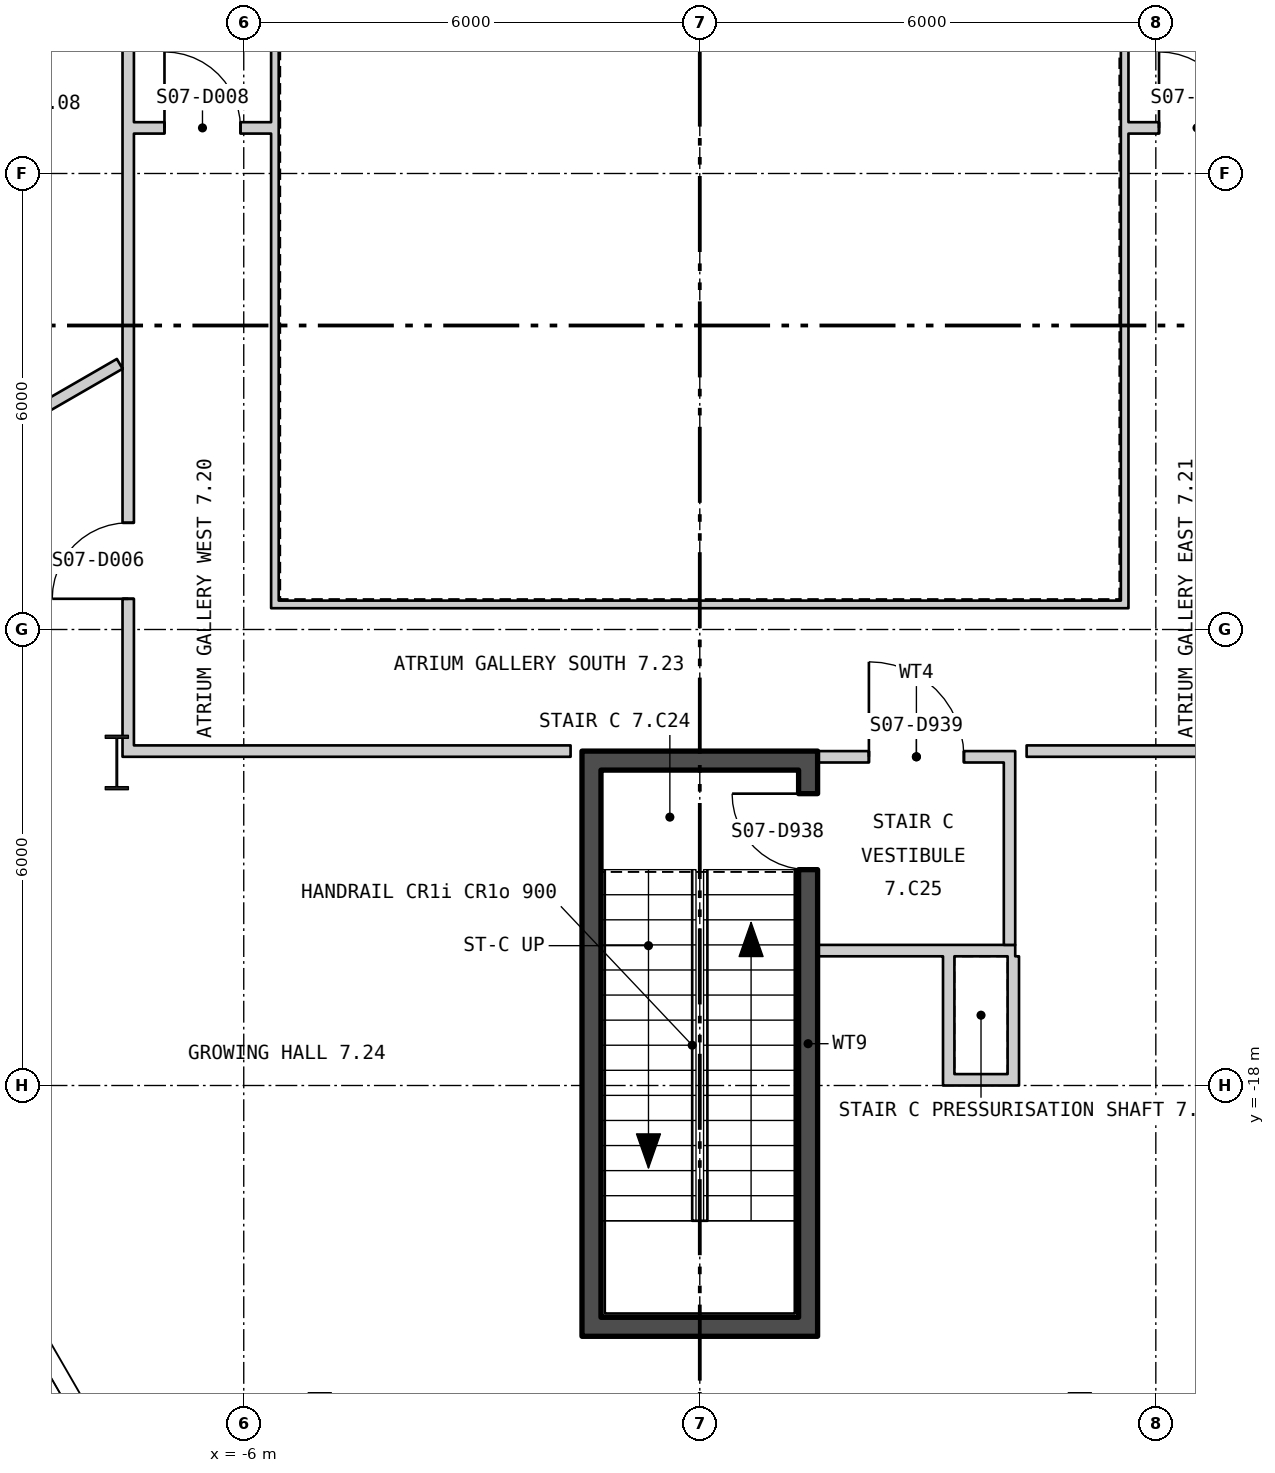
"""IFC4 building model, lengths in metres.
Left out: names, types, materials, properties, quantities, classifications, styles, units other than length and angle.
Written with IfcOpenShell. Run it as: python <this file> out.ifc"""

import sys

from ifc_helpers import new_model, si_unit, direction, frame, frame_2d, origin, origin_2d, place, context, subcontext, project, spatial, polyline, rectangle, i_section, outline, extrude, element, fill, save


model = new_model("IFC4")
c1 = context("Model", 3, precision=1e-05, world=origin(), true_north=direction((0.0, 1.0)))
c2 = subcontext(c1, "Body", "Model", "MODEL_VIEW")
j1 = project(units=[si_unit("LENGTHUNIT", "METRE"), si_unit("PLANEANGLEUNIT", "RADIAN")], contexts=[c1])
p1 = place(None, origin())
s1 = spatial("IfcSite", under=j1, at=p1, CompositionType="ELEMENT")
p2 = place(p1, origin())
s2 = spatial("IfcBuilding", under=s1, at=p2, CompositionType="ELEMENT")
p3 = place(p2, frame((0.0, 0.0, 97.8)))
s3 = spatial("IfcBuildingStorey", under=s2, at=p3, CompositionType="ELEMENT", Elevation=97.8)
for number, where, z_axis, x_axis in (
    (1, (-7.67, -13.75, 0.0), (0.0, 0.0, 1.0), (1.0, 0.0, 0.0)),
    (2, (5.0, -22.4, 0.0), (0.0, 0.0, 1.0), (1.0, 0.0, 0.0)),
    (3, (-5.0, -22.4, 0.0), (0.0, 0.0, 1.0), (1.0, 0.0, 0.0)),
):
    element("IfcColumn", number, at=place(p3, frame(where, z_axis=z_axis, x_axis=x_axis)), inside=s3, PredefinedType="COLUMN", context=c2, shape_type="SweptSolid", body=[
        extrude(i_section(OverallWidth=0.304, OverallDepth=0.716, WebThickness=0.021, FlangeThickness=0.04, at=origin_2d()), origin(), (0.0, 0.0, 1.0), 4.5),
    ])
p4 = place(p3, frame((-27.775, 11.479, -0.18), z_axis=(0.0, 0.0, 1.0), x_axis=(0.500000711659, -0.866024992908, 0.0)))
e4 = element("IfcWall", 4, at=p4, inside=s3, PredefinedType="SOLIDWALL", context=c2, shape_type="SweptSolid", body=[
    extrude(outline(polyline([(-0.13, -0.225), (45.87, -0.225), (45.61, 0.225), (0.13, 0.225), (-0.13, -0.225)])), origin(), (0.0, 0.0, 1.0), 4.28),
])
p5 = place(p4, frame((1.424, 0.0, 1.08)))
e5 = element("IfcOpeningElement", 5, at=p5, cuts=e4, PredefinedType="OPENING", context=c2, shape_type="SweptSolid", body=[
    extrude(rectangle(XDim=2.4, YDim=2.6, at=frame_2d((1.2, 1.3))), frame((0.0, 0.235, 0.0), z_axis=(0.0, -1.0, 0.0), x_axis=(1.0, 0.0, 0.0)), (0.0, 0.0, 1.0), 0.47),
])
p6 = place(p4, frame((5.893, 0.0, 1.08)))
e6 = element("IfcOpeningElement", 6, at=p6, cuts=e4, PredefinedType="OPENING", context=c2, shape_type="SweptSolid", body=[
    extrude(rectangle(XDim=2.4, YDim=2.6, at=frame_2d((1.2, 1.3))), frame((0.0, 0.235, 0.0), z_axis=(0.0, -1.0, 0.0), x_axis=(1.0, 0.0, 0.0)), (0.0, 0.0, 1.0), 0.47),
])
p7 = place(p4, frame((10.401, 0.0, 1.08)))
e7 = element("IfcOpeningElement", 7, at=p7, cuts=e4, PredefinedType="OPENING", context=c2, shape_type="SweptSolid", body=[
    extrude(rectangle(XDim=2.4, YDim=2.6, at=frame_2d((1.2, 1.3))), frame((0.0, 0.235, 0.0), z_axis=(0.0, -1.0, 0.0), x_axis=(1.0, 0.0, 0.0)), (0.0, 0.0, 1.0), 0.47),
])
p8 = place(p4, frame((14.909, 0.0, 1.08)))
e8 = element("IfcOpeningElement", 8, at=p8, cuts=e4, PredefinedType="OPENING", context=c2, shape_type="SweptSolid", body=[
    extrude(rectangle(XDim=2.4, YDim=2.6, at=frame_2d((1.2, 1.3))), frame((0.0, 0.235, 0.0), z_axis=(0.0, -1.0, 0.0), x_axis=(1.0, 0.0, 0.0)), (0.0, 0.0, 1.0), 0.47),
])
p9 = place(p4, frame((19.416, 0.0, 1.08)))
e9 = element("IfcOpeningElement", 9, at=p9, cuts=e4, PredefinedType="OPENING", context=c2, shape_type="SweptSolid", body=[
    extrude(rectangle(XDim=2.4, YDim=2.6, at=frame_2d((1.2, 1.3))), frame((0.0, 0.235, 0.0), z_axis=(0.0, -1.0, 0.0), x_axis=(1.0, 0.0, 0.0)), (0.0, 0.0, 1.0), 0.47),
])
p10 = place(p4, frame((23.924, 0.0, 1.08)))
e10 = element("IfcOpeningElement", 10, at=p10, cuts=e4, PredefinedType="OPENING", context=c2, shape_type="SweptSolid", body=[
    extrude(rectangle(XDim=2.4, YDim=2.6, at=frame_2d((1.2, 1.3))), frame((0.0, 0.235, 0.0), z_axis=(0.0, -1.0, 0.0), x_axis=(1.0, 0.0, 0.0)), (0.0, 0.0, 1.0), 0.47),
])
p11 = place(p4, frame((28.431, 0.0, 1.08)))
e11 = element("IfcOpeningElement", 11, at=p11, cuts=e4, PredefinedType="OPENING", context=c2, shape_type="SweptSolid", body=[
    extrude(rectangle(XDim=2.4, YDim=2.6, at=frame_2d((1.2, 1.3))), frame((0.0, 0.235, 0.0), z_axis=(0.0, -1.0, 0.0), x_axis=(1.0, 0.0, 0.0)), (0.0, 0.0, 1.0), 0.47),
])
p12 = place(p4, frame((32.939, 0.0, 1.08)))
e12 = element("IfcOpeningElement", 12, at=p12, cuts=e4, PredefinedType="OPENING", context=c2, shape_type="SweptSolid", body=[
    extrude(rectangle(XDim=2.4, YDim=2.6, at=frame_2d((1.2, 1.3))), frame((0.0, 0.235, 0.0), z_axis=(0.0, -1.0, 0.0), x_axis=(1.0, 0.0, 0.0)), (0.0, 0.0, 1.0), 0.47),
])
p13 = place(p4, frame((37.447, 0.0, 1.08)))
e13 = element("IfcOpeningElement", 13, at=p13, cuts=e4, PredefinedType="OPENING", context=c2, shape_type="SweptSolid", body=[
    extrude(rectangle(XDim=2.4, YDim=2.6, at=frame_2d((1.2, 1.3))), frame((0.0, 0.235, 0.0), z_axis=(0.0, -1.0, 0.0), x_axis=(1.0, 0.0, 0.0)), (0.0, 0.0, 1.0), 0.47),
])
p14 = place(p4, frame((41.916, 0.0, 1.08)))
e14 = element("IfcOpeningElement", 14, at=p14, cuts=e4, PredefinedType="OPENING", context=c2, shape_type="SweptSolid", body=[
    extrude(rectangle(XDim=2.4, YDim=2.6, at=frame_2d((1.2, 1.3))), frame((0.0, 0.235, 0.0), z_axis=(0.0, -1.0, 0.0), x_axis=(1.0, 0.0, 0.0)), (0.0, 0.0, 1.0), 0.47),
])
p15 = place(p3, frame((4.905, -28.133, -0.18), z_axis=(0.0, 0.0, 1.0), x_axis=(0.500000711659, 0.866024992908, 0.0)))
e15 = element("IfcWall", 15, at=p15, inside=s3, PredefinedType="SOLIDWALL", context=c2, shape_type="SweptSolid", body=[
    extrude(outline(polyline([(-0.13, -0.225), (45.87, -0.225), (45.61, 0.225), (0.13, 0.225), (-0.13, -0.225)])), origin(), (0.0, 0.0, 1.0), 4.28),
])
p16 = place(p15, frame((1.424, 0.0, 1.08)))
e16 = element("IfcOpeningElement", 16, at=p16, cuts=e15, PredefinedType="OPENING", context=c2, shape_type="SweptSolid", body=[
    extrude(rectangle(XDim=2.4, YDim=2.6, at=frame_2d((1.2, 1.3))), frame((0.0, 0.235, 0.0), z_axis=(0.0, -1.0, 0.0), x_axis=(1.0, 0.0, 0.0)), (0.0, 0.0, 1.0), 0.47),
])
p17 = place(p15, frame((5.893, 0.0, 1.08)))
e17 = element("IfcOpeningElement", 17, at=p17, cuts=e15, PredefinedType="OPENING", context=c2, shape_type="SweptSolid", body=[
    extrude(rectangle(XDim=2.4, YDim=2.6, at=frame_2d((1.2, 1.3))), frame((0.0, 0.235, 0.0), z_axis=(0.0, -1.0, 0.0), x_axis=(1.0, 0.0, 0.0)), (0.0, 0.0, 1.0), 0.47),
])
p18 = place(p15, frame((10.401, 0.0, 1.08)))
e18 = element("IfcOpeningElement", 18, at=p18, cuts=e15, PredefinedType="OPENING", context=c2, shape_type="SweptSolid", body=[
    extrude(rectangle(XDim=2.4, YDim=2.6, at=frame_2d((1.2, 1.3))), frame((0.0, 0.235, 0.0), z_axis=(0.0, -1.0, 0.0), x_axis=(1.0, 0.0, 0.0)), (0.0, 0.0, 1.0), 0.47),
])
p19 = place(p15, frame((14.909, 0.0, 1.08)))
e19 = element("IfcOpeningElement", 19, at=p19, cuts=e15, PredefinedType="OPENING", context=c2, shape_type="SweptSolid", body=[
    extrude(rectangle(XDim=2.4, YDim=2.6, at=frame_2d((1.2, 1.3))), frame((0.0, 0.235, 0.0), z_axis=(0.0, -1.0, 0.0), x_axis=(1.0, 0.0, 0.0)), (0.0, 0.0, 1.0), 0.47),
])
p20 = place(p15, frame((19.416, 0.0, 1.08)))
e20 = element("IfcOpeningElement", 20, at=p20, cuts=e15, PredefinedType="OPENING", context=c2, shape_type="SweptSolid", body=[
    extrude(rectangle(XDim=2.4, YDim=2.6, at=frame_2d((1.2, 1.3))), frame((0.0, 0.235, 0.0), z_axis=(0.0, -1.0, 0.0), x_axis=(1.0, 0.0, 0.0)), (0.0, 0.0, 1.0), 0.47),
])
p21 = place(p15, frame((28.431, 0.0, 1.08)))
e21 = element("IfcOpeningElement", 21, at=p21, cuts=e15, PredefinedType="OPENING", context=c2, shape_type="SweptSolid", body=[
    extrude(rectangle(XDim=2.4, YDim=2.6, at=frame_2d((1.2, 1.3))), frame((0.0, 0.235, 0.0), z_axis=(0.0, -1.0, 0.0), x_axis=(1.0, 0.0, 0.0)), (0.0, 0.0, 1.0), 0.47),
])
p22 = place(p15, frame((32.939, 0.0, 1.08)))
e22 = element("IfcOpeningElement", 22, at=p22, cuts=e15, PredefinedType="OPENING", context=c2, shape_type="SweptSolid", body=[
    extrude(rectangle(XDim=2.4, YDim=2.6, at=frame_2d((1.2, 1.3))), frame((0.0, 0.235, 0.0), z_axis=(0.0, -1.0, 0.0), x_axis=(1.0, 0.0, 0.0)), (0.0, 0.0, 1.0), 0.47),
])
p23 = place(p15, frame((37.447, 0.0, 1.08)))
e23 = element("IfcOpeningElement", 23, at=p23, cuts=e15, PredefinedType="OPENING", context=c2, shape_type="SweptSolid", body=[
    extrude(rectangle(XDim=2.4, YDim=2.6, at=frame_2d((1.2, 1.3))), frame((0.0, 0.235, 0.0), z_axis=(0.0, -1.0, 0.0), x_axis=(1.0, 0.0, 0.0)), (0.0, 0.0, 1.0), 0.47),
])
p24 = place(p15, frame((41.916, 0.0, 1.08)))
e24 = element("IfcOpeningElement", 24, at=p24, cuts=e15, PredefinedType="OPENING", context=c2, shape_type="SweptSolid", body=[
    extrude(rectangle(XDim=2.4, YDim=2.6, at=frame_2d((1.2, 1.3))), frame((0.0, 0.235, 0.0), z_axis=(0.0, -1.0, 0.0), x_axis=(1.0, 0.0, 0.0)), (0.0, 0.0, 1.0), 0.47),
])
p25 = place(p3, frame((-5.64, -11.67, 0.0), z_axis=(0.0, 0.0, 1.0), x_axis=(1.0, 0.0, 0.0)))
e25 = element("IfcWall", 25, at=p25, inside=s3, PredefinedType="PARTITIONING", context=c2, shape_type="SweptSolid", body=[
    extrude(rectangle(XDim=11.28, YDim=0.1, at=frame_2d((5.64, 0.0))), origin(), (0.0, 0.0, 1.0), 4.3),
])
for number, where, z_axis, x_axis in (
    (26, (5.59, -11.62, 0.0), (0.0, 0.0, 1.0), (0.0, 1.0, 0.0)),
    (27, (-5.59, -3.58, 0.0), (0.0, 0.0, 1.0), (0.0, -1.0, 0.0)),
):
    element("IfcWall", number, at=place(p3, frame(where, z_axis=z_axis, x_axis=x_axis)), inside=s3, PredefinedType="PARTITIONING", context=c2, shape_type="SweptSolid", body=[
        extrude(rectangle(XDim=8.04, YDim=0.1, at=frame_2d((4.02, 0.0))), origin(), (0.0, 0.0, 1.0), 4.3),
    ])
p26 = place(p3, frame((-1.425, -21.05, 0.0), z_axis=(0.0, 0.0, 1.0), x_axis=(0.0, 1.0, 0.0)))
e28 = element("IfcWall", 28, at=p26, inside=s3, PredefinedType="SHEAR", context=c2, shape_type="SweptSolid", body=[
    extrude(rectangle(XDim=7.2, YDim=0.25, at=frame_2d((3.6, 0.0))), origin(), (0.0, 0.0, 1.0), 4.3),
])
p27 = place(p3, frame((1.425, -21.05, 0.0), z_axis=(0.0, 0.0, 1.0), x_axis=(0.0, 1.0, 0.0)))
e29 = element("IfcWall", 29, at=p27, inside=s3, PredefinedType="SHEAR", context=c2, shape_type="SweptSolid", body=[
    extrude(rectangle(XDim=7.2, YDim=0.25, at=frame_2d((3.6, 0.0))), origin(), (0.0, 0.0, 1.0), 4.3),
])
p28 = place(p27, frame((5.89, 0.0, 0.0)))
e30 = element("IfcOpeningElement", 30, at=p28, cuts=e29, PredefinedType="OPENING", context=c2, shape_type="SweptSolid", body=[
    extrude(rectangle(XDim=1.0, YDim=2.1, at=frame_2d((0.5, 1.05))), frame((0.0, 0.135, 0.0), z_axis=(0.0, -1.0, 0.0), x_axis=(1.0, 0.0, 0.0)), (0.0, 0.0, 1.0), 0.27),
])
for number, where, z_axis, x_axis in (
    (31, (-1.55, -21.175, 0.0), (0.0, 0.0, 1.0), (1.0, 0.0, 0.0)),
    (32, (-1.55, -13.725, 0.0), (0.0, 0.0, 1.0), (1.0, 0.0, 0.0)),
):
    element("IfcWall", number, at=place(p3, frame(where, z_axis=z_axis, x_axis=x_axis)), inside=s3, PredefinedType="SHEAR", context=c2, shape_type="SweptSolid", body=[
        extrude(rectangle(XDim=3.1, YDim=0.25, at=frame_2d((1.55, 0.0))), origin(), (0.0, 0.0, 1.0), 4.3),
    ])
p29 = place(p3, frame((1.55, -16.225, 0.0), z_axis=(0.0, 0.0, 1.0), x_axis=(1.0, 0.0, 0.0)))
e33 = element("IfcWall", 33, at=p29, inside=s3, PredefinedType="PARTITIONING", context=c2, shape_type="SweptSolid", body=[
    extrude(rectangle(XDim=2.6, YDim=0.15, at=frame_2d((1.3, 0.0))), origin(), (0.0, 0.0, 1.0), 4.3),
])
p30 = place(p3, frame((4.075, -16.15, 0.0), z_axis=(0.0, 0.0, 1.0), x_axis=(0.0, 1.0, 0.0)))
e34 = element("IfcWall", 34, at=p30, inside=s3, PredefinedType="PARTITIONING", context=c2, shape_type="SweptSolid", body=[
    extrude(rectangle(XDim=2.4, YDim=0.15, at=frame_2d((1.2, 0.0))), origin(), (0.0, 0.0, 1.0), 4.3),
])
p31 = place(p3, frame((1.55, -13.675, 0.0), z_axis=(0.0, 0.0, 1.0), x_axis=(1.0, 0.0, 0.0)))
e35 = element("IfcWall", 35, at=p31, inside=s3, PredefinedType="PARTITIONING", context=c2, shape_type="SweptSolid", body=[
    extrude(rectangle(XDim=2.6, YDim=0.15, at=frame_2d((1.3, 0.0))), origin(), (0.0, 0.0, 1.0), 3.39),
])
p32 = place(p31, frame((0.675, 0.0, 0.0)))
e36 = element("IfcOpeningElement", 36, at=p32, cuts=e35, PredefinedType="OPENING", context=c2, shape_type="SweptSolid", body=[
    extrude(rectangle(XDim=1.25, YDim=2.1, at=frame_2d((0.625, 1.05))), frame((0.0, 0.085, 0.0), z_axis=(0.0, -1.0, 0.0), x_axis=(1.0, 0.0, 0.0)), (0.0, 0.0, 1.0), 0.17),
])
p33 = place(p3, frame((3.275, -18.0, 0.0), z_axis=(0.0, 0.0, 1.0), x_axis=(0.0, 1.0, 0.0)))
e37 = element("IfcWall", 37, at=p33, inside=s3, PredefinedType="PARTITIONING", context=c2, shape_type="SweptSolid", body=[
    extrude(rectangle(XDim=1.7, YDim=0.15, at=frame_2d((0.85, 0.0))), origin(), (0.0, 0.0, 1.0), 3.7),
])
p34 = place(p3, frame((3.35, -17.925, 0.0), z_axis=(0.0, 0.0, 1.0), x_axis=(1.0, 0.0, 0.0)))
e38 = element("IfcWall", 38, at=p34, inside=s3, PredefinedType="PARTITIONING", context=c2, shape_type="SweptSolid", body=[
    extrude(rectangle(XDim=0.7, YDim=0.15, at=frame_2d((0.35, 0.0))), origin(), (0.0, 0.0, 1.0), 4.3),
])
p35 = place(p3, frame((4.125, -18.0, 0.0), z_axis=(0.0, 0.0, 1.0), x_axis=(0.0, 1.0, 0.0)))
e39 = element("IfcWall", 39, at=p35, inside=s3, PredefinedType="PARTITIONING", context=c2, shape_type="SweptSolid", body=[
    extrude(rectangle(XDim=1.7, YDim=0.15, at=frame_2d((0.85, 0.0))), origin(), (0.0, 0.0, 1.0), 4.3),
])
p36 = place(p3, frame((-13.502, -11.892, 0.0), z_axis=(0.0, 0.0, 1.0), x_axis=(0.866156106014, 0.499773548734, 0.0)))
e40 = element("IfcWall", 40, at=p36, inside=s3, PredefinedType="PARTITIONING", context=c2, shape_type="SweptSolid", body=[
    extrude(rectangle(XDim=6.777, YDim=0.15, at=frame_2d((3.389, 0.0))), origin(), (0.0, 0.0, 1.0), 4.3),
])
p37 = place(p3, frame((-7.52, -13.675, 0.0), z_axis=(0.0, 0.0, 1.0), x_axis=(0.0, 1.0, 0.0)))
e41 = element("IfcWall", 41, at=p37, inside=s3, PredefinedType="PARTITIONING", context=c2, shape_type="SweptSolid", body=[
    extrude(rectangle(XDim=10.167, YDim=0.15, at=frame_2d((5.083, 0.0))), origin(), (0.0, 0.0, 1.0), 3.7),
])
p38 = place(p37, frame((2.079, 0.0, 0.0)))
e42 = element("IfcOpeningElement", 42, at=p38, cuts=e41, PredefinedType="OPENING", context=c2, shape_type="SweptSolid", body=[
    extrude(rectangle(XDim=1.0, YDim=2.1, at=frame_2d((0.5, 1.05))), frame((0.0, 0.085, 0.0), z_axis=(0.0, -1.0, 0.0), x_axis=(1.0, 0.0, 0.0)), (0.0, 0.0, 1.0), 0.17),
])
p39 = place(p3, frame((-7.445, -13.6, 0.0), z_axis=(0.0, 0.0, 1.0), x_axis=(1.0, 0.0, 0.0)))
e43 = element("IfcWall", 43, at=p39, inside=s3, PredefinedType="PARTITIONING", context=c2, shape_type="SweptSolid", body=[
    extrude(rectangle(XDim=5.745, YDim=0.15, at=frame_2d((2.873, 0.0))), origin(), (0.0, 0.0, 1.0), 3.39),
])
p40 = place(p3, frame((-7.445, -5.4, 0.0), z_axis=(0.0, 0.0, 1.0), x_axis=(1.0, 0.0, 0.0)))
e44 = element("IfcWall", 44, at=p40, inside=s3, PredefinedType="PARTITIONING", context=c2, shape_type="SweptSolid", body=[
    extrude(rectangle(XDim=1.805, YDim=0.15, at=frame_2d((0.902, 0.0))), origin(), (0.0, 0.0, 1.0), 4.3),
])
p41 = place(p40, frame((0.402, 0.0, 0.0)))
e45 = element("IfcOpeningElement", 45, at=p41, cuts=e44, PredefinedType="OPENING", context=c2, shape_type="SweptSolid", body=[
    extrude(rectangle(XDim=1.0, YDim=2.1, at=frame_2d((0.5, 1.05))), frame((0.0, 0.085, 0.0), z_axis=(0.0, -1.0, 0.0), x_axis=(1.0, 0.0, 0.0)), (0.0, 0.0, 1.0), 0.17),
])
p42 = place(p3, frame((4.3, -13.6, 0.0), z_axis=(0.0, 0.0, 1.0), x_axis=(1.0, 0.0, 0.0)))
e46 = element("IfcWall", 46, at=p42, inside=s3, PredefinedType="PARTITIONING", context=c2, shape_type="SweptSolid", body=[
    extrude(rectangle(XDim=3.145, YDim=0.15, at=frame_2d((1.573, 0.0))), origin(), (0.0, 0.0, 1.0), 3.39),
])
p43 = place(p3, frame((5.64, -5.4, 0.0), z_axis=(0.0, 0.0, 1.0), x_axis=(1.0, 0.0, 0.0)))
e47 = element("IfcWall", 47, at=p43, inside=s3, PredefinedType="PARTITIONING", context=c2, shape_type="SweptSolid", body=[
    extrude(rectangle(XDim=1.805, YDim=0.15, at=frame_2d((0.902, 0.0))), origin(), (0.0, 0.0, 1.0), 4.3),
])
p44 = place(p43, frame((0.402, 0.0, 0.0)))
e48 = element("IfcOpeningElement", 48, at=p44, cuts=e47, PredefinedType="OPENING", context=c2, shape_type="SweptSolid", body=[
    extrude(rectangle(XDim=1.0, YDim=2.1, at=frame_2d((0.5, 1.05))), frame((0.0, 0.085, 0.0), z_axis=(0.0, -1.0, 0.0), x_axis=(1.0, 0.0, 0.0)), (0.0, 0.0, 1.0), 0.17),
])
p45 = place(p13, origin())
e49 = element("IfcWindow", 49, at=p45, inside=s3, PartitioningType="SINGLE_PANEL", PredefinedType="WINDOW", context=c2, shape_type="SweptSolid", body=[
    extrude(rectangle(XDim=2.4, YDim=2.6, at=frame_2d((1.2, 1.3))), frame((0.0, 0.105, 0.0), z_axis=(0.0, -1.0, 0.0), x_axis=(1.0, 0.0, 0.0)), (0.0, 0.0, 1.0), 0.06),
])
fill(e13, e49)
p46 = place(p28, origin())
e50 = element("IfcDoor", 50, at=p46, inside=s3, OperationType="SINGLE_SWING_LEFT", PredefinedType="DOOR", context=c2, shape_type="SweptSolid", body=[
    extrude(rectangle(XDim=1.0, YDim=2.1, at=frame_2d((0.5, 1.05))), frame((0.0, 0.025, 0.0), z_axis=(0.0, -1.0, 0.0), x_axis=(1.0, 0.0, 0.0)), (0.0, 0.0, 1.0), 0.05),
])
fill(e30, e50)
p47 = place(p32, origin())
e51 = element("IfcDoor", 51, at=p47, inside=s3, OperationType="SINGLE_SWING_RIGHT", PredefinedType="DOOR", context=c2, shape_type="SweptSolid", body=[
    extrude(rectangle(XDim=1.25, YDim=2.1, at=frame_2d((0.625, 1.05))), frame((0.0, 0.025, 0.0), z_axis=(0.0, -1.0, 0.0), x_axis=(1.0, 0.0, 0.0)), (0.0, 0.0, 1.0), 0.05),
])
fill(e36, e51)
p48 = place(p38, origin())
e52 = element("IfcDoor", 52, at=p48, inside=s3, OperationType="SINGLE_SWING_RIGHT", PredefinedType="DOOR", context=c2, shape_type="SweptSolid", body=[
    extrude(rectangle(XDim=1.0, YDim=2.1, at=frame_2d((0.5, 1.05))), frame((0.0, 0.025, 0.0), z_axis=(0.0, -1.0, 0.0), x_axis=(1.0, 0.0, 0.0)), (0.0, 0.0, 1.0), 0.05),
])
fill(e42, e52)
p49 = place(p41, origin())
e53 = element("IfcDoor", 53, at=p49, inside=s3, OperationType="SINGLE_SWING_RIGHT", PredefinedType="DOOR", context=c2, shape_type="SweptSolid", body=[
    extrude(rectangle(XDim=1.0, YDim=2.1, at=frame_2d((0.5, 1.05))), frame((0.0, 0.025, 0.0), z_axis=(0.0, -1.0, 0.0), x_axis=(1.0, 0.0, 0.0)), (0.0, 0.0, 1.0), 0.05),
])
fill(e45, e53)
p50 = place(p44, origin())
e54 = element("IfcDoor", 54, at=p50, inside=s3, OperationType="SINGLE_SWING_RIGHT", PredefinedType="DOOR", context=c2, shape_type="SweptSolid", body=[
    extrude(rectangle(XDim=1.0, YDim=2.1, at=frame_2d((0.5, 1.05))), frame((0.0, 0.025, 0.0), z_axis=(0.0, -1.0, 0.0), x_axis=(1.0, 0.0, 0.0)), (0.0, 0.0, 1.0), 0.05),
])
fill(e48, e54)
save(model, sys.argv[1])
